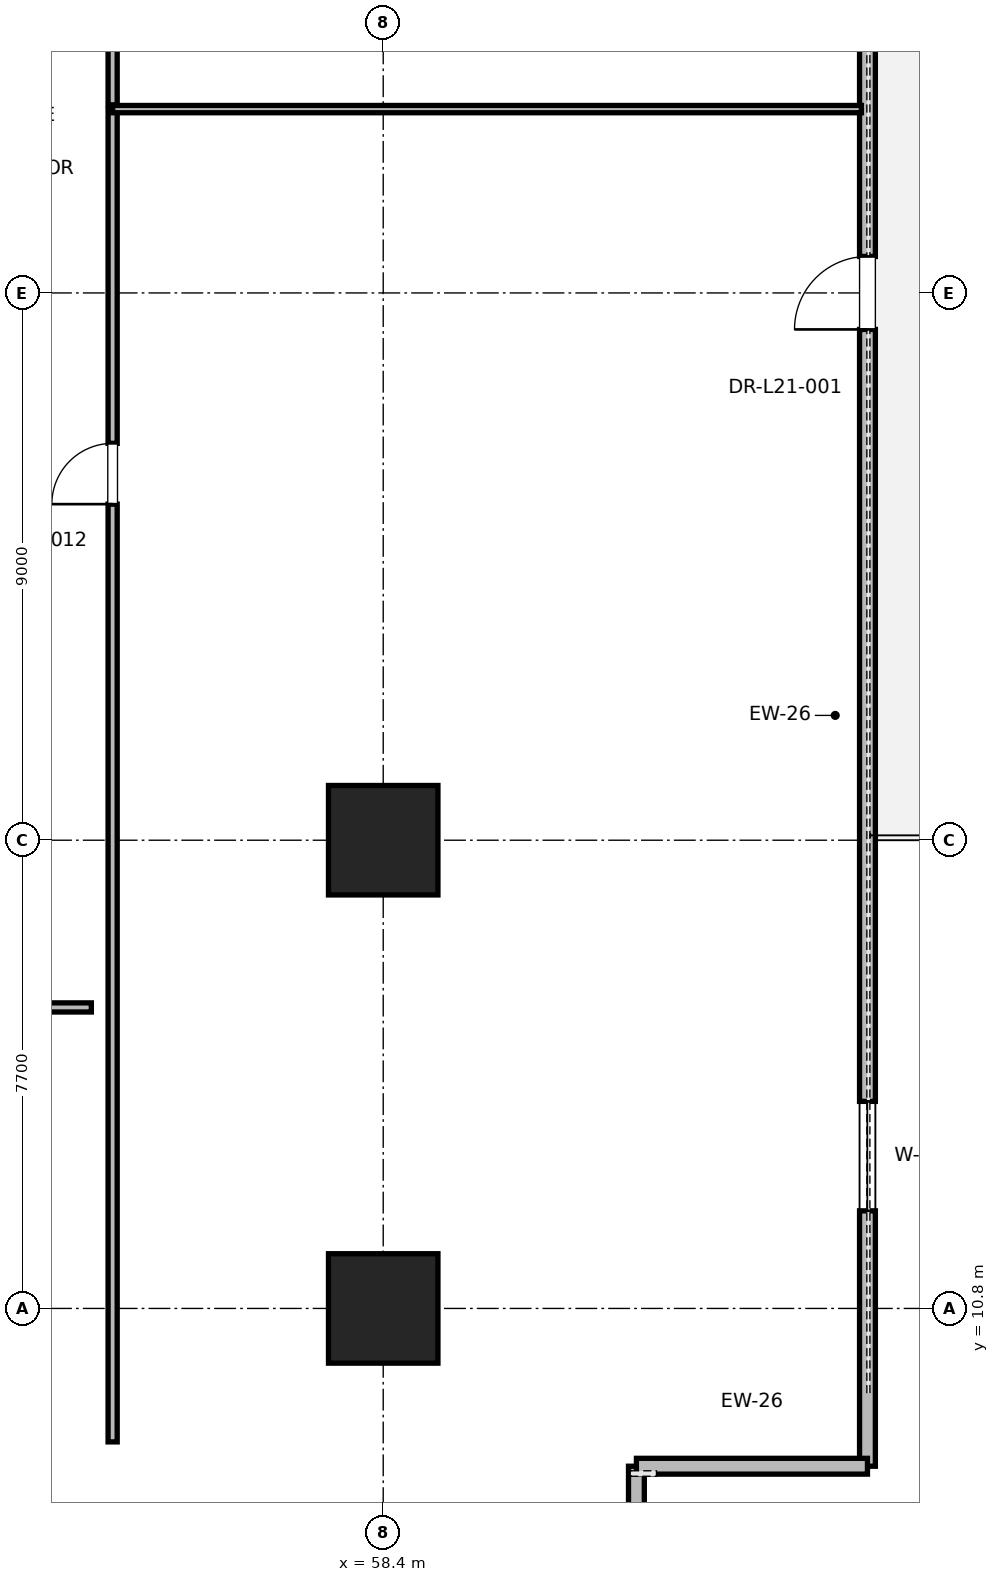
"""IFC4 building model, lengths in metres.
Left out: names, types, materials, properties, quantities, classifications, styles, units other than length and angle.
Written with IfcOpenShell. Run it as: python <this file> out.ifc"""

import sys

from ifc_helpers import new_model, si_unit, direction, frame, frame_2d, origin, origin_2d, place, context, subcontext, project, spatial, rectangle, extrude, element, fill, save


model = new_model("IFC4")
c1 = context("Model", 3, precision=1e-05, world=origin(), true_north=direction((0.0, 1.0)))
c2 = subcontext(c1, "Body", "Model", "MODEL_VIEW")
j1 = project(units=[si_unit("LENGTHUNIT", "METRE"), si_unit("PLANEANGLEUNIT", "RADIAN")], contexts=[c1])
p1 = place(None, origin())
s1 = spatial("IfcSite", under=j1, at=p1, CompositionType="ELEMENT")
p2 = place(p1, origin())
s2 = spatial("IfcBuilding", under=s1, at=p2, CompositionType="ELEMENT")
p3 = place(p2, frame((0.0, 0.0, 91.6)))
s3 = spatial("IfcBuildingStorey", under=s2, at=p3, CompositionType="ELEMENT", Elevation=91.6)
for number, where, z_axis, x_axis in (
    (1, (58.4, 18.5, 0.0), (0.0, 0.0, 1.0), (1.0, 0.0, 0.0)),
    (2, (58.4, 10.8, 0.0), (0.0, 0.0, 1.0), (1.0, 0.0, 0.0)),
):
    element("IfcColumn", number, at=place(p3, frame(where, z_axis=z_axis, x_axis=x_axis)), inside=s3, PredefinedType="COLUMN", context=c2, shape_type="SweptSolid", body=[
        extrude(rectangle(XDim=1.8, YDim=1.8, at=origin_2d()), origin(), (0.0, 0.0, 1.0), 4.0),
    ])
p4 = place(p3, frame((66.364, 8.205, 0.0), z_axis=(0.0, 0.0, 1.0), x_axis=(0.0, 1.0, 0.0)))
e3 = element("IfcWall", 3, at=p4, inside=s3, PredefinedType="PARAPET", context=c2, shape_type="SweptSolid", body=[
    extrude(rectangle(XDim=38.59, YDim=0.26, at=frame_2d((19.295, 0.0))), origin(), (0.0, 0.0, 1.0), 2.889),
])
p5 = place(p4, frame((4.2, 0.0, 0.85)))
e4 = element("IfcOpeningElement", 4, at=p5, cuts=e3, PredefinedType="OPENING", context=c2, shape_type="SweptSolid", body=[
    extrude(rectangle(XDim=1.8, YDim=2.2, at=frame_2d((0.9, 1.1))), frame((0.0, 0.13, 0.0), z_axis=(0.0, -1.0, 0.0), x_axis=(1.0, 0.0, 0.0)), (0.0, 0.0, 1.0), 0.26),
])
p6 = place(p4, frame((18.695, 0.0, 0.0)))
e5 = element("IfcOpeningElement", 5, at=p6, cuts=e3, PredefinedType="OPENING", context=c2, shape_type="SweptSolid", body=[
    extrude(rectangle(XDim=1.2, YDim=2.2, at=frame_2d((0.6, 1.1))), frame((0.0, 0.13, 0.0), z_axis=(0.0, -1.0, 0.0), x_axis=(1.0, 0.0, 0.0)), (0.0, 0.0, 1.0), 0.26),
])
p7 = place(p4, frame((32.59, 0.0, 0.85)))
e6 = element("IfcOpeningElement", 6, at=p7, cuts=e3, PredefinedType="OPENING", context=c2, shape_type="SweptSolid", body=[
    extrude(rectangle(XDim=1.8, YDim=2.2, at=frame_2d((0.9, 1.1))), frame((0.0, 0.13, 0.0), z_axis=(0.0, -1.0, 0.0), x_axis=(1.0, 0.0, 0.0)), (0.0, 0.0, 1.0), 0.26),
])
p8 = place(p3, frame((62.564, 4.805, 0.0), z_axis=(0.0, 0.0, 1.0), x_axis=(0.0, 1.0, 0.0)))
e7 = element("IfcWall", 7, at=p8, inside=s3, PredefinedType="PARAPET", context=c2, shape_type="SweptSolid", body=[
    extrude(rectangle(XDim=3.4, YDim=0.26, at=frame_2d((1.7, 0.0))), origin(), (0.0, 0.0, 1.0), 3.76),
])
p9 = place(p8, frame((1.0, 0.0, 0.85)))
e8 = element("IfcOpeningElement", 8, at=p9, cuts=e7, PredefinedType="OPENING", context=c2, shape_type="SweptSolid", body=[
    extrude(rectangle(XDim=1.4, YDim=2.0, at=frame_2d((0.7, 1.0))), frame((0.0, 0.13, 0.0), z_axis=(0.0, -1.0, 0.0), x_axis=(1.0, 0.0, 0.0)), (0.0, 0.0, 1.0), 0.26),
])
p10 = place(p3, frame((62.564, 8.205, 0.0), z_axis=(0.0, 0.0, 1.0), x_axis=(1.0, 0.0, 0.0)))
e9 = element("IfcWall", 9, at=p10, inside=s3, PredefinedType="PARAPET", context=c2, shape_type="SweptSolid", body=[
    extrude(rectangle(XDim=3.8, YDim=0.26, at=frame_2d((1.9, 0.0))), origin(), (0.0, 0.0, 1.0), 3.76),
])
p11 = place(p3, frame((45.782, 15.75, 0.0), z_axis=(0.0, 0.0, 1.0), x_axis=(1.0, 0.0, 0.0)))
e10 = element("IfcWall", 10, at=p11, inside=s3, PredefinedType="PARTITIONING", context=c2, shape_type="SweptSolid", body=[
    extrude(rectangle(XDim=7.818, YDim=0.15, at=frame_2d((3.909, 0.0))), origin(), (0.0, 0.0, 1.0), 2.85),
])
p12 = place(p11, frame((3.359, 0.0, 0.0)))
e11 = element("IfcOpeningElement", 11, at=p12, cuts=e10, PredefinedType="OPENING", context=c2, shape_type="SweptSolid", body=[
    extrude(rectangle(XDim=1.0, YDim=2.15, at=frame_2d((0.5, 1.075))), frame((0.0, 0.075, 0.0), z_axis=(0.0, -1.0, 0.0), x_axis=(1.0, 0.0, 0.0)), (0.0, 0.0, 1.0), 0.15),
])
p13 = place(p3, frame((53.95, 8.605, 0.0), z_axis=(0.0, 0.0, 1.0), x_axis=(0.0, 1.0, 0.0)))
e12 = element("IfcWall", 12, at=p13, inside=s3, PredefinedType="PARTITIONING", context=c2, shape_type="SweptSolid", body=[
    extrude(rectangle(XDim=21.918, YDim=0.15, at=frame_2d((10.959, 0.0))), origin(), (0.0, 0.0, 1.0), 2.85),
])
p14 = place(p13, frame((15.421, 0.0, 0.0)))
e13 = element("IfcOpeningElement", 13, at=p14, cuts=e12, PredefinedType="OPENING", context=c2, shape_type="SweptSolid", body=[
    extrude(rectangle(XDim=1.0, YDim=2.15, at=frame_2d((0.5, 1.075))), frame((0.0, 0.075, 0.0), z_axis=(0.0, -1.0, 0.0), x_axis=(1.0, 0.0, 0.0)), (0.0, 0.0, 1.0), 0.15),
])
p15 = place(p3, frame((53.95, 30.523, 0.0), z_axis=(0.0, 0.0, 1.0), x_axis=(1.0, 0.0, 0.0)))
e14 = element("IfcWall", 14, at=p15, inside=s3, PredefinedType="PARTITIONING", context=c2, shape_type="SweptSolid", body=[
    extrude(rectangle(XDim=12.314, YDim=0.12, at=frame_2d((6.157, 0.0))), origin(), (0.0, 0.0, 1.0), 2.85),
])
p16 = place(p3, frame((53.95, 30.593, 0.0), z_axis=(0.0, 0.0, 1.0), x_axis=(0.0, 1.0, 0.0)))
e15 = element("IfcWall", 15, at=p16, inside=s3, PredefinedType="PARTITIONING", context=c2, shape_type="SweptSolid", body=[
    extrude(rectangle(XDim=15.802, YDim=0.15, at=frame_2d((7.901, 0.0))), origin(), (0.0, 0.0, 1.0), 2.85),
])
p17 = place(p16, frame((2.403, 0.0, 0.0)))
e16 = element("IfcOpeningElement", 16, at=p17, cuts=e15, PredefinedType="OPENING", context=c2, shape_type="SweptSolid", body=[
    extrude(rectangle(XDim=1.0, YDim=2.15, at=frame_2d((0.5, 1.075))), frame((0.0, 0.075, 0.0), z_axis=(0.0, -1.0, 0.0), x_axis=(1.0, 0.0, 0.0)), (0.0, 0.0, 1.0), 0.15),
])
p18 = place(p5, origin())
e17 = element("IfcWindow", 17, at=p18, inside=s3, PartitioningType="SINGLE_PANEL", PredefinedType="WINDOW", context=c2, shape_type="SweptSolid", body=[
    extrude(rectangle(XDim=1.8, YDim=2.2, at=frame_2d((0.9, 1.1))), frame((0.0, 0.03, 0.0), z_axis=(0.0, -1.0, 0.0), x_axis=(1.0, 0.0, 0.0)), (0.0, 0.0, 1.0), 0.06),
])
fill(e4, e17)
p19 = place(p6, origin())
e18 = element("IfcDoor", 18, at=p19, inside=s3, OperationType="SINGLE_SWING_LEFT", PredefinedType="DOOR", context=c2, shape_type="SweptSolid", body=[
    extrude(rectangle(XDim=1.2, YDim=2.2, at=frame_2d((0.6, 1.1))), frame((0.0, 0.025, 0.0), z_axis=(0.0, -1.0, 0.0), x_axis=(1.0, 0.0, 0.0)), (0.0, 0.0, 1.0), 0.05),
])
fill(e5, e18)
p20 = place(p14, origin())
e19 = element("IfcDoor", 19, at=p20, inside=s3, OperationType="SINGLE_SWING_LEFT", PredefinedType="DOOR", context=c2, shape_type="SweptSolid", body=[
    extrude(rectangle(XDim=1.0, YDim=2.15, at=frame_2d((0.5, 1.075))), frame((0.0, 0.025, 0.0), z_axis=(0.0, -1.0, 0.0), x_axis=(1.0, 0.0, 0.0)), (0.0, 0.0, 1.0), 0.05),
])
fill(e13, e19)
save(model, sys.argv[1])
